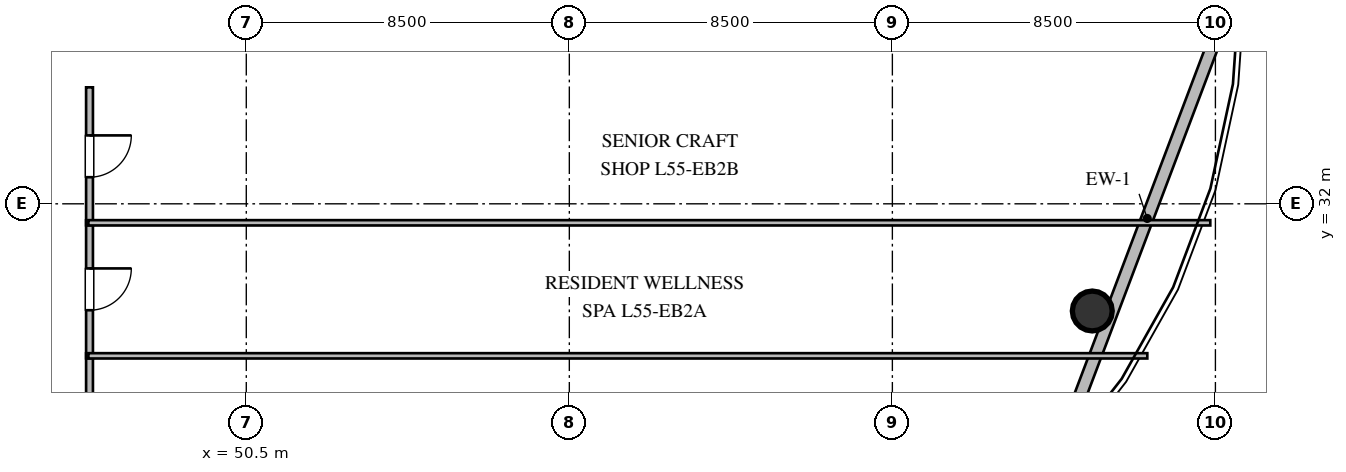
"""IFC4 building model, lengths in metres.
Left out: names, types, materials, properties, quantities, classifications, styles, units other than length and angle.
Written with IfcOpenShell. Run it as: python <this file> out.ifc"""

import sys

from ifc_helpers import new_model, si_unit, direction, frame, frame_2d, origin, origin_2d, place, context, subcontext, project, spatial, rectangle, circle, extrude, element, fill, save


model = new_model("IFC4")
c1 = context("Model", 3, precision=1e-05, world=origin(), true_north=direction((0.0, 1.0)))
c2 = subcontext(c1, "Body", "Model", "MODEL_VIEW")
j1 = project(units=[si_unit("LENGTHUNIT", "METRE"), si_unit("PLANEANGLEUNIT", "RADIAN")], contexts=[c1])
p1 = place(None, origin())
s1 = spatial("IfcSite", under=j1, at=p1, CompositionType="ELEMENT")
p2 = place(p1, origin())
s2 = spatial("IfcBuilding", under=s1, at=p2, CompositionType="ELEMENT")
p3 = place(p2, frame((0.0, 0.0, 210.0)))
s3 = spatial("IfcBuildingStorey", under=s2, at=p3, CompositionType="ELEMENT", Elevation=210.0)
p4 = place(p3, frame((72.76, 29.18, 0.0), z_axis=(0.0, 0.0, 1.0), x_axis=(1.0, 0.0, 0.0)))
e1 = element("IfcColumn", 1, at=p4, inside=s3, PredefinedType="COLUMN", context=c2, shape_type="SweptSolid", body=[
    extrude(circle(Radius=0.525, at=origin_2d()), origin(), (0.0, 0.0, 1.0), 3.6),
])
p5 = place(p3, frame((76.712, 38.243, 0.0), z_axis=(0.0, 0.0, 1.0), x_axis=(-0.353659523244, -0.935374225441, 0.0)))
e2 = element("IfcWall", 2, at=p5, inside=s3, PredefinedType="STANDARD", context=c2, shape_type="SweptSolid", body=[
    extrude(rectangle(XDim=14.172, YDim=0.32, at=frame_2d((7.086, 0.0))), origin(), (0.0, 0.0, 1.0), 3.36),
])
p6 = place(p3, frame((46.375, 28.065, 0.0), z_axis=(0.0, 0.0, 1.0), x_axis=(0.0, -1.0, 0.0)))
e3 = element("IfcWall", 3, at=p6, inside=s3, PredefinedType="PARTITIONING", context=c2, shape_type="SweptSolid", body=[
    extrude(rectangle(XDim=3.52, YDim=0.18, at=frame_2d((1.76, 0.0))), origin(), (0.0, 0.0, 1.0), 3.36),
])
p7 = place(p6, frame((1.21, 0.0, 0.0)))
e4 = element("IfcOpeningElement", 4, at=p7, cuts=e3, PredefinedType="OPENING", context=c2, shape_type="SweptSolid", body=[
    extrude(rectangle(XDim=1.1, YDim=2.1, at=frame_2d((0.55, 1.05))), frame((0.0, 0.1, 0.0), z_axis=(0.0, -1.0, 0.0), x_axis=(1.0, 0.0, 0.0)), (0.0, 0.0, 1.0), 0.2),
])
p8 = place(p3, frame((46.375, 31.565, 0.0), z_axis=(0.0, 0.0, 1.0), x_axis=(0.0, -1.0, 0.0)))
e5 = element("IfcWall", 5, at=p8, inside=s3, PredefinedType="PARTITIONING", context=c2, shape_type="SweptSolid", body=[
    extrude(rectangle(XDim=3.63, YDim=0.18, at=frame_2d((1.815, 0.0))), origin(), (0.0, 0.0, 1.0), 3.36),
])
p9 = place(p8, frame((1.265, 0.0, 0.0)))
e6 = element("IfcOpeningElement", 6, at=p9, cuts=e5, PredefinedType="OPENING", context=c2, shape_type="SweptSolid", body=[
    extrude(rectangle(XDim=1.1, YDim=2.1, at=frame_2d((0.55, 1.05))), frame((0.0, 0.1, 0.0), z_axis=(0.0, -1.0, 0.0), x_axis=(1.0, 0.0, 0.0)), (0.0, 0.0, 1.0), 0.2),
])
p10 = place(p3, frame((46.375, 35.065, 0.0), z_axis=(0.0, 0.0, 1.0), x_axis=(0.0, -1.0, 0.0)))
e7 = element("IfcWall", 7, at=p10, inside=s3, PredefinedType="PARTITIONING", context=c2, shape_type="SweptSolid", body=[
    extrude(rectangle(XDim=3.63, YDim=0.18, at=frame_2d((1.815, 0.0))), origin(), (0.0, 0.0, 1.0), 3.36),
])
p11 = place(p10, frame((1.265, 0.0, 0.0)))
e8 = element("IfcOpeningElement", 8, at=p11, cuts=e7, PredefinedType="OPENING", context=c2, shape_type="SweptSolid", body=[
    extrude(rectangle(XDim=1.1, YDim=2.1, at=frame_2d((0.55, 1.05))), frame((0.0, 0.1, 0.0), z_axis=(0.0, -1.0, 0.0), x_axis=(1.0, 0.0, 0.0)), (0.0, 0.0, 1.0), 0.2),
])
p12 = place(p3, frame((46.345, 28.0, 0.0), z_axis=(0.0, 0.0, 1.0), x_axis=(1.0, 0.0, 0.0)))
e9 = element("IfcWall", 9, at=p12, inside=s3, PredefinedType="PARTITIONING", context=c2, shape_type="SweptSolid", body=[
    extrude(rectangle(XDim=27.863, YDim=0.14, at=frame_2d((13.932, 0.0))), origin(), (0.0, 0.0, 1.0), 2.89),
])
p13 = place(p3, frame((46.345, 31.5, 0.0), z_axis=(0.0, 0.0, 1.0), x_axis=(1.0, 0.0, 0.0)))
e10 = element("IfcWall", 10, at=p13, inside=s3, PredefinedType="PARTITIONING", context=c2, shape_type="SweptSolid", body=[
    extrude(rectangle(XDim=29.52, YDim=0.14, at=frame_2d((14.76, 0.0))), origin(), (0.0, 0.0, 1.0), 3.36),
])
p14 = place(p9, origin())
e11 = element("IfcDoor", 11, at=p14, inside=s3, OperationType="SINGLE_SWING_LEFT", PredefinedType="DOOR", context=c2, shape_type="SweptSolid", body=[
    extrude(rectangle(XDim=1.1, YDim=2.1, at=frame_2d((0.55, 1.05))), frame((0.0, 0.025, 0.0), z_axis=(0.0, -1.0, 0.0), x_axis=(1.0, 0.0, 0.0)), (0.0, 0.0, 1.0), 0.05),
])
fill(e6, e11)
p15 = place(p11, origin())
e12 = element("IfcDoor", 12, at=p15, inside=s3, OperationType="SINGLE_SWING_LEFT", PredefinedType="DOOR", context=c2, shape_type="SweptSolid", body=[
    extrude(rectangle(XDim=1.1, YDim=2.1, at=frame_2d((0.55, 1.05))), frame((0.0, 0.025, 0.0), z_axis=(0.0, -1.0, 0.0), x_axis=(1.0, 0.0, 0.0)), (0.0, 0.0, 1.0), 0.05),
])
fill(e8, e12)
save(model, sys.argv[1])
